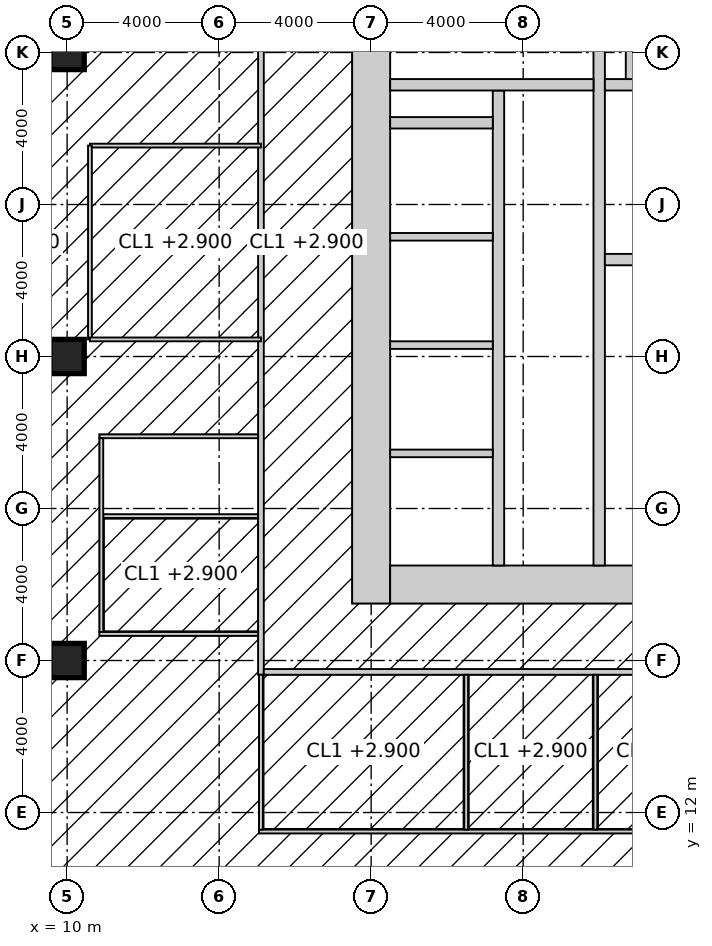
"""IFC4 building model, lengths in metres.
Left out: names, types, materials, properties, quantities, classifications, styles, units other than length and angle.
Written with IfcOpenShell. Run it as: python <this file> out.ifc"""

import sys

from ifc_helpers import new_model, si_unit, direction, frame, frame_2d, origin, origin_2d, place, context, subcontext, project, spatial, rectangle, hollow_rectangle, extrude, element, fill, save


model = new_model("IFC4")
c1 = context("Model", 3, precision=1e-05, world=origin(), true_north=direction((0.0, 1.0)))
c2 = subcontext(c1, "Body", "Model", "MODEL_VIEW")
j1 = project(units=[si_unit("LENGTHUNIT", "METRE"), si_unit("PLANEANGLEUNIT", "RADIAN")], contexts=[c1])
p1 = place(None, origin())
s1 = spatial("IfcSite", under=j1, at=p1, CompositionType="ELEMENT")
p2 = place(p1, origin())
s2 = spatial("IfcBuilding", under=s1, at=p2, CompositionType="ELEMENT")
p3 = place(p2, frame((0.0, 0.0, 147.8)))
s3 = spatial("IfcBuildingStorey", under=s2, at=p3, CompositionType="ELEMENT", Elevation=147.8)
for number, where, z_axis, x_axis in (
    (1, (10.0, 16.0, 0.0), (0.0, 0.0, 1.0), (1.0, 0.0, 0.0)),
    (2, (10.0, 24.0, 0.0), (0.0, 0.0, 1.0), (1.0, 0.0, 0.0)),
    (3, (10.0, 32.0, 0.0), (0.0, 0.0, 1.0), (1.0, 0.0, 0.0)),
):
    element("IfcColumn", number, at=place(p3, frame(where, z_axis=z_axis, x_axis=x_axis)), inside=s3, PredefinedType="COLUMN", context=c2, shape_type="SweptSolid", body=[
        extrude(hollow_rectangle(XDim=0.9, YDim=0.9, WallThickness=0.1, at=origin_2d()), origin(), (0.0, 0.0, 1.0), 4.0),
    ])
p4 = place(p3, frame((18.0, 17.5, -0.15), z_axis=(0.0, 0.0, 1.0), x_axis=(0.0, 1.0, 0.0)))
e4 = element("IfcWall", 4, at=p4, inside=s3, PredefinedType="SHEAR", context=c2, shape_type="SweptSolid", body=[
    extrude(rectangle(XDim=19.0, YDim=1.0, at=frame_2d((9.5, 0.0))), origin(), (0.0, 0.0, 1.0), 4.0),
])
p5 = place(p3, frame((18.5, 18.0, -0.15), z_axis=(0.0, 0.0, 1.0), x_axis=(1.0, 0.0, 0.0)))
e5 = element("IfcWall", 5, at=p5, inside=s3, PredefinedType="SHEAR", context=c2, shape_type="SweptSolid", body=[
    extrude(rectangle(XDim=17.6, YDim=1.0, at=frame_2d((8.8, 0.0))), origin(), (0.0, 0.0, 1.0), 4.0),
])
p6 = place(p5, frame((3.45, 0.0, 0.15)))
e6 = element("IfcOpeningElement", 6, at=p6, cuts=e5, PredefinedType="OPENING", context=c2, shape_type="SweptSolid", body=[
    extrude(rectangle(XDim=1.5, YDim=2.4, at=frame_2d((0.75, 1.2))), frame((0.0, 0.51, 0.0), z_axis=(0.0, -1.0, 0.0), x_axis=(1.0, 0.0, 0.0)), (0.0, 0.0, 1.0), 1.02),
])
p7 = place(p3, frame((24.0, 18.5, -0.15), z_axis=(0.0, 0.0, 1.0), x_axis=(0.0, 1.0, 0.0)))
e7 = element("IfcWall", 7, at=p7, inside=s3, PredefinedType="SHEAR", context=c2, shape_type="SweptSolid", body=[
    extrude(rectangle(XDim=17.0, YDim=0.3, at=frame_2d((8.5, 0.0))), origin(), (0.0, 0.0, 1.0), 4.0),
])
p8 = place(p7, frame((9.6, 0.0, 0.15)))
e8 = element("IfcOpeningElement", 8, at=p8, cuts=e7, PredefinedType="OPENING", context=c2, shape_type="SweptSolid", body=[
    extrude(rectangle(XDim=1.5, YDim=2.4, at=frame_2d((0.75, 1.2))), frame((0.0, 0.16, 0.0), z_axis=(0.0, -1.0, 0.0), x_axis=(1.0, 0.0, 0.0)), (0.0, 0.0, 1.0), 0.32),
])
p9 = place(p3, frame((24.15, 26.55, -0.15), z_axis=(0.0, 0.0, 1.0), x_axis=(1.0, 0.0, 0.0)))
e9 = element("IfcWall", 9, at=p9, inside=s3, PredefinedType="SHEAR", context=c2, shape_type="SweptSolid", body=[
    extrude(rectangle(XDim=11.25, YDim=0.3, at=frame_2d((5.625, 0.0))), origin(), (0.0, 0.0, 1.0), 4.0),
])
p10 = place(p9, frame((9.25, 0.0, 0.15)))
e10 = element("IfcOpeningElement", 10, at=p10, cuts=e9, PredefinedType="OPENING", context=c2, shape_type="SweptSolid", body=[
    extrude(rectangle(XDim=1.0, YDim=2.2, at=frame_2d((0.5, 1.1))), frame((0.0, 0.16, 0.0), z_axis=(0.0, -1.0, 0.0), x_axis=(1.0, 0.0, 0.0)), (0.0, 0.0, 1.0), 0.32),
])
p11 = place(p9, frame((4.9, 0.0, 0.15)))
e11 = element("IfcOpeningElement", 11, at=p11, cuts=e9, PredefinedType="OPENING", context=c2, shape_type="SweptSolid", body=[
    extrude(rectangle(XDim=1.5, YDim=2.4, at=frame_2d((0.75, 1.2))), frame((0.0, 0.16, 0.0), z_axis=(0.0, -1.0, 0.0), x_axis=(1.0, 0.0, 0.0)), (0.0, 0.0, 1.0), 0.32),
])
p12 = place(p3, frame((24.15, 31.15, -0.15), z_axis=(0.0, 0.0, 1.0), x_axis=(1.0, 0.0, 0.0)))
e12 = element("IfcWall", 12, at=p12, inside=s3, PredefinedType="SHEAR", context=c2, shape_type="SweptSolid", body=[
    extrude(rectangle(XDim=11.25, YDim=0.3, at=frame_2d((5.625, 0.0))), origin(), (0.0, 0.0, 1.0), 4.0),
])
p13 = place(p12, frame((7.25, 0.0, 0.15)))
e13 = element("IfcOpeningElement", 13, at=p13, cuts=e12, PredefinedType="OPENING", context=c2, shape_type="SweptSolid", body=[
    extrude(rectangle(XDim=1.4, YDim=2.4, at=frame_2d((0.7, 1.2))), frame((0.0, 0.16, 0.0), z_axis=(0.0, -1.0, 0.0), x_axis=(1.0, 0.0, 0.0)), (0.0, 0.0, 1.0), 0.32),
])
p14 = place(p3, frame((21.35, 18.5, -0.15), z_axis=(0.0, 0.0, 1.0), x_axis=(0.0, 1.0, 0.0)))
e14 = element("IfcWall", 14, at=p14, inside=s3, PredefinedType="SHEAR", context=c2, shape_type="SweptSolid", body=[
    extrude(rectangle(XDim=12.5, YDim=0.3, at=frame_2d((6.25, 0.0))), origin(), (0.0, 0.0, 1.0), 4.0),
])
p15 = place(p14, frame((0.875, 0.0, 0.15)))
e15 = element("IfcOpeningElement", 15, at=p15, cuts=e14, PredefinedType="OPENING", context=c2, shape_type="SweptSolid", body=[
    extrude(rectangle(XDim=1.1, YDim=2.2, at=frame_2d((0.55, 1.1))), frame((0.0, 0.16, 0.0), z_axis=(0.0, -1.0, 0.0), x_axis=(1.0, 0.0, 0.0)), (0.0, 0.0, 1.0), 0.32),
])
p16 = place(p14, frame((3.825, 0.0, 0.15)))
e16 = element("IfcOpeningElement", 16, at=p16, cuts=e14, PredefinedType="OPENING", context=c2, shape_type="SweptSolid", body=[
    extrude(rectangle(XDim=1.1, YDim=2.2, at=frame_2d((0.55, 1.1))), frame((0.0, 0.16, 0.0), z_axis=(0.0, -1.0, 0.0), x_axis=(1.0, 0.0, 0.0)), (0.0, 0.0, 1.0), 0.32),
])
p17 = place(p14, frame((6.675, 0.0, 0.15)))
e17 = element("IfcOpeningElement", 17, at=p17, cuts=e14, PredefinedType="OPENING", context=c2, shape_type="SweptSolid", body=[
    extrude(rectangle(XDim=1.1, YDim=2.2, at=frame_2d((0.55, 1.1))), frame((0.0, 0.16, 0.0), z_axis=(0.0, -1.0, 0.0), x_axis=(1.0, 0.0, 0.0)), (0.0, 0.0, 1.0), 0.32),
])
p18 = place(p14, frame((9.575, 0.0, 0.15)))
e18 = element("IfcOpeningElement", 18, at=p18, cuts=e14, PredefinedType="OPENING", context=c2, shape_type="SweptSolid", body=[
    extrude(rectangle(XDim=1.1, YDim=2.2, at=frame_2d((0.55, 1.1))), frame((0.0, 0.16, 0.0), z_axis=(0.0, -1.0, 0.0), x_axis=(1.0, 0.0, 0.0)), (0.0, 0.0, 1.0), 0.32),
])
p19 = place(p3, frame((18.5, 31.15, -0.15), z_axis=(0.0, 0.0, 1.0), x_axis=(1.0, 0.0, 0.0)))
e19 = element("IfcWall", 19, at=p19, inside=s3, PredefinedType="SHEAR", context=c2, shape_type="SweptSolid", body=[
    extrude(rectangle(XDim=5.35, YDim=0.3, at=frame_2d((2.675, 0.0))), origin(), (0.0, 0.0, 1.0), 4.0),
])
p20 = place(p19, frame((3.4, 0.0, 0.15)))
e20 = element("IfcOpeningElement", 20, at=p20, cuts=e19, PredefinedType="OPENING", context=c2, shape_type="SweptSolid", body=[
    extrude(rectangle(XDim=1.0, YDim=2.2, at=frame_2d((0.5, 1.1))), frame((0.0, 0.16, 0.0), z_axis=(0.0, -1.0, 0.0), x_axis=(1.0, 0.0, 0.0)), (0.0, 0.0, 1.0), 0.32),
])
p21 = place(p3, frame((18.5, 30.15, -0.15), z_axis=(0.0, 0.0, 1.0), x_axis=(1.0, 0.0, 0.0)))
e21 = element("IfcWall", 21, at=p21, inside=s3, PredefinedType="SHEAR", context=c2, shape_type="SweptSolid", body=[
    extrude(rectangle(XDim=2.7, YDim=0.3, at=frame_2d((1.35, 0.0))), origin(), (0.0, 0.0, 1.0), 4.0),
])
p22 = place(p3, frame((24.85, 31.3, -0.15), z_axis=(0.0, 0.0, 1.0), x_axis=(0.0, 1.0, 0.0)))
e22 = element("IfcWall", 22, at=p22, inside=s3, PredefinedType="SHEAR", context=c2, shape_type="SweptSolid", body=[
    extrude(rectangle(XDim=4.2, YDim=0.3, at=frame_2d((2.1, 0.0))), origin(), (0.0, 0.0, 1.0), 4.0),
])
for number, where, z_axis, x_axis in (
    (23, (18.5, 21.45, -0.15), (0.0, 0.0, 1.0), (1.0, 0.0, 0.0)),
    (24, (18.5, 24.3, -0.15), (0.0, 0.0, 1.0), (1.0, 0.0, 0.0)),
    (25, (18.5, 27.15, -0.15), (0.0, 0.0, 1.0), (1.0, 0.0, 0.0)),
):
    element("IfcWall", number, at=place(p3, frame(where, z_axis=z_axis, x_axis=x_axis)), inside=s3, PredefinedType="SOLIDWALL", context=c2, shape_type="SweptSolid", body=[
        extrude(rectangle(XDim=2.7, YDim=0.2, at=frame_2d((1.35, 0.0))), origin(), (0.0, 0.0, 1.0), 4.0),
    ])
p23 = place(p3, frame((15.1, 15.625, 0.0), z_axis=(0.0, 0.0, 1.0), x_axis=(0.0, 1.0, 0.0)))
e26 = element("IfcWall", 26, at=p23, inside=s3, PredefinedType="PARTITIONING", context=c2, shape_type="SweptSolid", body=[
    extrude(rectangle(XDim=22.75, YDim=0.15, at=frame_2d((11.375, 0.0))), origin(), (0.0, 0.0, 1.0), 3.85),
])
p24 = place(p23, frame((10.475, 0.0, 0.0)))
e27 = element("IfcOpeningElement", 27, at=p24, cuts=e26, PredefinedType="OPENING", context=c2, shape_type="SweptSolid", body=[
    extrude(rectangle(XDim=1.8, YDim=2.4, at=frame_2d((0.9, 1.2))), frame((0.0, 0.085, 0.0), z_axis=(0.0, -1.0, 0.0), x_axis=(1.0, 0.0, 0.0)), (0.0, 0.0, 1.0), 0.17),
])
p25 = place(p3, frame((15.175, 15.7, 0.0), z_axis=(0.0, 0.0, 1.0), x_axis=(1.0, 0.0, 0.0)))
e28 = element("IfcWall", 28, at=p25, inside=s3, PredefinedType="PARTITIONING", context=c2, shape_type="SweptSolid", body=[
    extrude(rectangle(XDim=22.65, YDim=0.15, at=frame_2d((11.325, 0.0))), origin(), (0.0, 0.0, 1.0), 3.85),
])
p26 = place(p3, frame((15.05, 11.5, 0.0), z_axis=(0.0, 0.0, 1.0), x_axis=(1.0, 0.0, 0.0)))
e29 = element("IfcWall", 29, at=p26, inside=s3, PredefinedType="PARTITIONING", context=c2, shape_type="SweptSolid", body=[
    extrude(rectangle(XDim=12.889, YDim=0.1, at=frame_2d((6.444, 0.0))), origin(), (0.0, 0.0, 1.0), 3.85),
])
p27 = place(p26, frame((2.25, 0.0, 0.0)))
e30 = element("IfcOpeningElement", 30, at=p27, cuts=e29, PredefinedType="OPENING", context=c2, shape_type="SweptSolid", body=[
    extrude(rectangle(XDim=1.0, YDim=2.2, at=frame_2d((0.5, 1.1))), frame((0.0, 0.06, 0.0), z_axis=(0.0, -1.0, 0.0), x_axis=(1.0, 0.0, 0.0)), (0.0, 0.0, 1.0), 0.12),
])
p28 = place(p26, frame((6.65, 0.0, 0.0)))
e31 = element("IfcOpeningElement", 31, at=p28, cuts=e29, PredefinedType="OPENING", context=c2, shape_type="SweptSolid", body=[
    extrude(rectangle(XDim=1.0, YDim=2.2, at=frame_2d((0.5, 1.1))), frame((0.0, 0.06, 0.0), z_axis=(0.0, -1.0, 0.0), x_axis=(1.0, 0.0, 0.0)), (0.0, 0.0, 1.0), 0.12),
])
p29 = place(p26, frame((10.399, 0.0, 0.0)))
e32 = element("IfcOpeningElement", 32, at=p29, cuts=e29, PredefinedType="OPENING", context=c2, shape_type="SweptSolid", body=[
    extrude(rectangle(XDim=1.0, YDim=2.2, at=frame_2d((0.5, 1.1))), frame((0.0, 0.06, 0.0), z_axis=(0.0, -1.0, 0.0), x_axis=(1.0, 0.0, 0.0)), (0.0, 0.0, 1.0), 0.12),
])
p30 = place(p3, frame((10.85, 16.7, 0.0), z_axis=(0.0, 0.0, 1.0), x_axis=(1.0, 0.0, 0.0)))
e33 = element("IfcWall", 33, at=p30, inside=s3, PredefinedType="PARTITIONING", context=c2, shape_type="SweptSolid", body=[
    extrude(rectangle(XDim=4.175, YDim=0.1, at=frame_2d((2.087, 0.0))), origin(), (0.0, 0.0, 1.0), 3.85),
])
p31 = place(p3, frame((10.95, 19.8, 0.0), z_axis=(0.0, 0.0, 1.0), x_axis=(1.0, 0.0, 0.0)))
e34 = element("IfcWall", 34, at=p31, inside=s3, PredefinedType="PARTITIONING", context=c2, shape_type="SweptSolid", body=[
    extrude(rectangle(XDim=4.075, YDim=0.1, at=frame_2d((2.038, 0.0))), origin(), (0.0, 0.0, 1.0), 2.85),
])
p32 = place(p3, frame((10.85, 21.9, 0.0), z_axis=(0.0, 0.0, 1.0), x_axis=(1.0, 0.0, 0.0)))
e35 = element("IfcWall", 35, at=p32, inside=s3, PredefinedType="PARTITIONING", context=c2, shape_type="SweptSolid", body=[
    extrude(rectangle(XDim=4.175, YDim=0.1, at=frame_2d((2.087, 0.0))), origin(), (0.0, 0.0, 1.0), 3.85),
])
p33 = place(p3, frame((10.9, 16.75, 0.0), z_axis=(0.0, 0.0, 1.0), x_axis=(0.0, 1.0, 0.0)))
e36 = element("IfcWall", 36, at=p33, inside=s3, PredefinedType="PARTITIONING", context=c2, shape_type="SweptSolid", body=[
    extrude(rectangle(XDim=5.1, YDim=0.1, at=frame_2d((2.55, 0.0))), origin(), (0.0, 0.0, 1.0), 3.85),
])
p34 = place(p33, frame((1.0, 0.0, 0.0)))
e37 = element("IfcOpeningElement", 37, at=p34, cuts=e36, PredefinedType="OPENING", context=c2, shape_type="SweptSolid", body=[
    extrude(rectangle(XDim=1.0, YDim=2.2, at=frame_2d((0.5, 1.1))), frame((0.0, 0.06, 0.0), z_axis=(0.0, -1.0, 0.0), x_axis=(1.0, 0.0, 0.0)), (0.0, 0.0, 1.0), 0.12),
])
p35 = place(p33, frame((3.6, 0.0, 0.0)))
e38 = element("IfcOpeningElement", 38, at=p35, cuts=e36, PredefinedType="OPENING", context=c2, shape_type="SweptSolid", body=[
    extrude(rectangle(XDim=1.0, YDim=2.2, at=frame_2d((0.5, 1.1))), frame((0.0, 0.06, 0.0), z_axis=(0.0, -1.0, 0.0), x_axis=(1.0, 0.0, 0.0)), (0.0, 0.0, 1.0), 0.12),
])
for number, where, z_axis, x_axis in (
    (39, (15.1, 11.55, 0.0), (0.0, 0.0, 1.0), (0.0, 1.0, 0.0)),
    (40, (20.5, 11.55, 0.0), (0.0, 0.0, 1.0), (0.0, 1.0, 0.0)),
    (41, (23.9, 11.55, 0.0), (0.0, 0.0, 1.0), (0.0, 1.0, 0.0)),
):
    element("IfcWall", number, at=place(p3, frame(where, z_axis=z_axis, x_axis=x_axis)), inside=s3, PredefinedType="PARTITIONING", context=c2, shape_type="SweptSolid", body=[
        extrude(rectangle(XDim=4.075, YDim=0.1, at=frame_2d((2.038, 0.0))), origin(), (0.0, 0.0, 1.0), 3.85),
    ])
p36 = place(p3, frame((15.1, 29.55, 0.0), z_axis=(0.0, 0.0, 1.0), x_axis=(-1.0, 0.0, 0.0)))
e42 = element("IfcWall", 42, at=p36, inside=s3, PredefinedType="PARTITIONING", context=c2, shape_type="SweptSolid", body=[
    extrude(rectangle(XDim=4.5, YDim=0.1, at=frame_2d((2.25, 0.0))), origin(), (0.0, 0.0, 1.0), 3.85),
])
p37 = place(p3, frame((10.6, 29.55, 0.0), z_axis=(0.0, 0.0, 1.0), x_axis=(0.0, -1.0, 0.0)))
e43 = element("IfcWall", 43, at=p37, inside=s3, PredefinedType="PARTITIONING", context=c2, shape_type="SweptSolid", body=[
    extrude(rectangle(XDim=5.1, YDim=0.1, at=frame_2d((2.55, 0.0))), origin(), (0.0, 0.0, 1.0), 3.85),
])
p38 = place(p37, frame((2.05, 0.0, 0.0)))
e44 = element("IfcOpeningElement", 44, at=p38, cuts=e43, PredefinedType="OPENING", context=c2, shape_type="SweptSolid", body=[
    extrude(rectangle(XDim=1.0, YDim=2.2, at=frame_2d((0.5, 1.1))), frame((0.0, 0.06, 0.0), z_axis=(0.0, -1.0, 0.0), x_axis=(1.0, 0.0, 0.0)), (0.0, 0.0, 1.0), 0.12),
])
p39 = place(p3, frame((10.6, 24.45, 0.0), z_axis=(0.0, 0.0, 1.0), x_axis=(1.0, 0.0, 0.0)))
e45 = element("IfcWall", 45, at=p39, inside=s3, PredefinedType="PARTITIONING", context=c2, shape_type="SweptSolid", body=[
    extrude(rectangle(XDim=4.5, YDim=0.1, at=frame_2d((2.25, 0.0))), origin(), (0.0, 0.0, 1.0), 2.95),
])
p40 = place(p8, origin())
e46 = element("IfcDoor", 46, at=p40, inside=s3, OperationType="DOUBLE_DOOR_DOUBLE_SWING", PredefinedType="DOOR", context=c2, shape_type="SweptSolid", body=[
    extrude(rectangle(XDim=1.5, YDim=2.4, at=frame_2d((0.75, 1.2))), frame((0.0, 0.025, 0.0), z_axis=(0.0, -1.0, 0.0), x_axis=(1.0, 0.0, 0.0)), (0.0, 0.0, 1.0), 0.05),
])
fill(e8, e46)
p41 = place(p20, origin())
e47 = element("IfcDoor", 47, at=p41, inside=s3, OperationType="SINGLE_SWING_LEFT", PredefinedType="DOOR", context=c2, shape_type="SweptSolid", body=[
    extrude(rectangle(XDim=1.0, YDim=2.2, at=frame_2d((0.5, 1.1))), frame((0.0, 0.025, 0.0), z_axis=(0.0, -1.0, 0.0), x_axis=(1.0, 0.0, 0.0)), (0.0, 0.0, 1.0), 0.05),
])
fill(e20, e47)
p42 = place(p6, origin())
e48 = element("IfcDoor", 48, at=p42, inside=s3, OperationType="DOUBLE_DOOR_DOUBLE_SWING", PredefinedType="DOOR", context=c2, shape_type="SweptSolid", body=[
    extrude(rectangle(XDim=1.5, YDim=2.4, at=frame_2d((0.75, 1.2))), frame((0.0, 0.025, 0.0), z_axis=(0.0, -1.0, 0.0), x_axis=(1.0, 0.0, 0.0)), (0.0, 0.0, 1.0), 0.05),
])
fill(e6, e48)
p43 = place(p24, origin())
e49 = element("IfcDoor", 49, at=p43, inside=s3, OperationType="DOUBLE_DOOR_DOUBLE_SWING", PredefinedType="DOOR", context=c2, shape_type="SweptSolid", body=[
    extrude(rectangle(XDim=1.8, YDim=2.4, at=frame_2d((0.9, 1.2))), frame((0.0, 0.025, 0.0), z_axis=(0.0, -1.0, 0.0), x_axis=(1.0, 0.0, 0.0)), (0.0, 0.0, 1.0), 0.05),
])
fill(e27, e49)
p44 = place(p27, origin())
e50 = element("IfcDoor", 50, at=p44, inside=s3, OperationType="SINGLE_SWING_RIGHT", PredefinedType="DOOR", context=c2, shape_type="SweptSolid", body=[
    extrude(rectangle(XDim=1.0, YDim=2.2, at=frame_2d((0.5, 1.1))), frame((0.0, 0.025, 0.0), z_axis=(0.0, -1.0, 0.0), x_axis=(1.0, 0.0, 0.0)), (0.0, 0.0, 1.0), 0.05),
])
fill(e30, e50)
p45 = place(p28, origin())
e51 = element("IfcDoor", 51, at=p45, inside=s3, OperationType="SINGLE_SWING_LEFT", PredefinedType="DOOR", context=c2, shape_type="SweptSolid", body=[
    extrude(rectangle(XDim=1.0, YDim=2.2, at=frame_2d((0.5, 1.1))), frame((0.0, 0.025, 0.0), z_axis=(0.0, -1.0, 0.0), x_axis=(1.0, 0.0, 0.0)), (0.0, 0.0, 1.0), 0.05),
])
fill(e31, e51)
p46 = place(p34, origin())
e52 = element("IfcDoor", 52, at=p46, inside=s3, OperationType="SINGLE_SWING_LEFT", PredefinedType="DOOR", context=c2, shape_type="SweptSolid", body=[
    extrude(rectangle(XDim=1.0, YDim=2.2, at=frame_2d((0.5, 1.1))), frame((0.0, 0.025, 0.0), z_axis=(0.0, -1.0, 0.0), x_axis=(1.0, 0.0, 0.0)), (0.0, 0.0, 1.0), 0.05),
])
fill(e37, e52)
p47 = place(p35, origin())
e53 = element("IfcDoor", 53, at=p47, inside=s3, OperationType="SINGLE_SWING_LEFT", PredefinedType="DOOR", context=c2, shape_type="SweptSolid", body=[
    extrude(rectangle(XDim=1.0, YDim=2.2, at=frame_2d((0.5, 1.1))), frame((0.0, 0.025, 0.0), z_axis=(0.0, -1.0, 0.0), x_axis=(1.0, 0.0, 0.0)), (0.0, 0.0, 1.0), 0.05),
])
fill(e38, e53)
p48 = place(p38, origin())
e54 = element("IfcDoor", 54, at=p48, inside=s3, OperationType="SINGLE_SWING_RIGHT", PredefinedType="DOOR", context=c2, shape_type="SweptSolid", body=[
    extrude(rectangle(XDim=1.0, YDim=2.2, at=frame_2d((0.5, 1.1))), frame((0.0, 0.025, 0.0), z_axis=(0.0, -1.0, 0.0), x_axis=(1.0, 0.0, 0.0)), (0.0, 0.0, 1.0), 0.05),
])
fill(e44, e54)
p49 = place(p15, origin())
e55 = element("IfcDoor", 55, at=p49, inside=s3, OperationType="DOUBLE_DOOR_SLIDING", PredefinedType="DOOR", context=c2, shape_type="SweptSolid", body=[
    extrude(rectangle(XDim=1.1, YDim=2.2, at=frame_2d((0.55, 1.1))), frame((0.0, 0.025, 0.0), z_axis=(0.0, -1.0, 0.0), x_axis=(1.0, 0.0, 0.0)), (0.0, 0.0, 1.0), 0.05),
])
fill(e15, e55)
p50 = place(p16, origin())
e56 = element("IfcDoor", 56, at=p50, inside=s3, OperationType="DOUBLE_DOOR_SLIDING", PredefinedType="DOOR", context=c2, shape_type="SweptSolid", body=[
    extrude(rectangle(XDim=1.1, YDim=2.2, at=frame_2d((0.55, 1.1))), frame((0.0, 0.025, 0.0), z_axis=(0.0, -1.0, 0.0), x_axis=(1.0, 0.0, 0.0)), (0.0, 0.0, 1.0), 0.05),
])
fill(e16, e56)
p51 = place(p17, origin())
e57 = element("IfcDoor", 57, at=p51, inside=s3, OperationType="DOUBLE_DOOR_SLIDING", PredefinedType="DOOR", context=c2, shape_type="SweptSolid", body=[
    extrude(rectangle(XDim=1.1, YDim=2.2, at=frame_2d((0.55, 1.1))), frame((0.0, 0.025, 0.0), z_axis=(0.0, -1.0, 0.0), x_axis=(1.0, 0.0, 0.0)), (0.0, 0.0, 1.0), 0.05),
])
fill(e17, e57)
p52 = place(p18, origin())
e58 = element("IfcDoor", 58, at=p52, inside=s3, OperationType="DOUBLE_DOOR_SLIDING", PredefinedType="DOOR", context=c2, shape_type="SweptSolid", body=[
    extrude(rectangle(XDim=1.1, YDim=2.2, at=frame_2d((0.55, 1.1))), frame((0.0, 0.025, 0.0), z_axis=(0.0, -1.0, 0.0), x_axis=(1.0, 0.0, 0.0)), (0.0, 0.0, 1.0), 0.05),
])
fill(e18, e58)
save(model, sys.argv[1])
